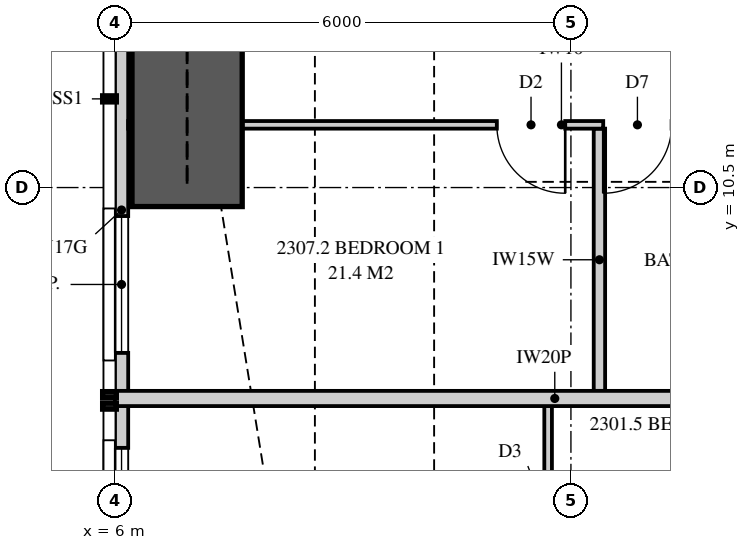
"""IFC4 building model, lengths in metres.
Left out: names, types, materials, properties, quantities, classifications, styles, units other than length and angle.
Written with IfcOpenShell. Run it as: python <this file> out.ifc"""

import sys

from ifc_helpers import new_model, si_unit, direction, frame, frame_2d, origin, place, context, subcontext, project, spatial, polyline, rectangle, outline, extrude, element, fill, save


model = new_model("IFC4")
c1 = context("Model", 3, precision=1e-05, world=origin(), true_north=direction((0.0, 1.0)))
c2 = subcontext(c1, "Body", "Model", "MODEL_VIEW")
j1 = project(units=[si_unit("LENGTHUNIT", "METRE"), si_unit("PLANEANGLEUNIT", "RADIAN")], contexts=[c1])
p1 = place(None, origin())
s1 = spatial("IfcSite", under=j1, at=p1, CompositionType="ELEMENT")
p2 = place(p1, origin())
s2 = spatial("IfcBuilding", under=s1, at=p2, CompositionType="ELEMENT")
p3 = place(p2, frame((0.0, 0.0, 88.1)))
s3 = spatial("IfcBuildingStorey", under=s2, at=p3, CompositionType="ELEMENT", Elevation=88.1)
p4 = place(p3, frame((6.087, 17.358, 0.0), z_axis=(0.0, 0.0, 1.0), x_axis=(0.0, -1.0, 0.0)))
e1 = element("IfcWall", 1, at=p4, inside=s3, PredefinedType="SOLIDWALL", context=c2, shape_type="SweptSolid", body=[
    extrude(outline(polyline([(0.0, 0.0), (14.307, 0.0), (14.307, 3.11), (4.577, 3.11), (4.577, 2.15), (4.484, 2.15), (4.484, 3.11), (4.358, 3.11), (4.358, 2.15), (0.0, 2.15), (0.0, 0.0)])), frame((0.0, 0.087, 0.0), z_axis=(0.0, -1.0, 0.0), x_axis=(1.0, 0.0, 0.0)), (0.0, 0.0, 1.0), 0.175),
])
p5 = place(p4, frame((0.3, 0.0, 0.4)))
e2 = element("IfcOpeningElement", 2, at=p5, cuts=e1, PredefinedType="OPENING", context=c2, shape_type="SweptSolid", body=[
    extrude(rectangle(XDim=1.2, YDim=1.7, at=frame_2d((0.6, 0.85))), frame((0.0, 0.097, 0.0), z_axis=(0.0, -1.0, 0.0), x_axis=(1.0, 0.0, 0.0)), (0.0, 0.0, 1.0), 0.195),
])
p6 = place(p4, frame((7.233, 0.0, 0.4)))
e3 = element("IfcOpeningElement", 3, at=p6, cuts=e1, PredefinedType="OPENING", context=c2, shape_type="SweptSolid", body=[
    extrude(rectangle(XDim=1.8, YDim=1.7, at=frame_2d((0.9, 0.85))), frame((0.0, 0.097, 0.0), z_axis=(0.0, -1.0, 0.0), x_axis=(1.0, 0.0, 0.0)), (0.0, 0.0, 1.0), 0.195),
])
p7 = place(p4, frame((10.283, 0.0, 0.4)))
e4 = element("IfcOpeningElement", 4, at=p7, cuts=e1, PredefinedType="OPENING", context=c2, shape_type="SweptSolid", body=[
    extrude(rectangle(XDim=1.8, YDim=1.7, at=frame_2d((0.9, 0.85))), frame((0.0, 0.097, 0.0), z_axis=(0.0, -1.0, 0.0), x_axis=(1.0, 0.0, 0.0)), (0.0, 0.0, 1.0), 0.195),
])
p8 = place(p3, frame((11.7, 0.175, 0.0), z_axis=(0.0, 0.0, 1.0), x_axis=(0.0, 1.0, 0.0)))
e5 = element("IfcWall", 5, at=p8, inside=s3, PredefinedType="PARTITIONING", context=c2, shape_type="SweptSolid", body=[
    extrude(outline(polyline([(0.0, 0.0), (7.45, 0.0), (7.45, 3.11), (2.708, 3.11), (2.708, 2.15), (0.953, 2.15), (0.953, 3.11), (0.0, 3.11), (0.0, 0.0)])), frame((0.0, 0.05, 0.0), z_axis=(0.0, -1.0, 0.0), x_axis=(1.0, 0.0, 0.0)), (0.0, 0.0, 1.0), 0.1),
])
p9 = place(p8, frame((2.701, 0.0, 0.0)))
e6 = element("IfcOpeningElement", 6, at=p9, cuts=e5, PredefinedType="OPENING", context=c2, shape_type="SweptSolid", body=[
    extrude(rectangle(XDim=0.9, YDim=2.1, at=frame_2d((0.45, 1.05))), frame((0.0, 0.06, 0.0), z_axis=(0.0, -1.0, 0.0), x_axis=(1.0, 0.0, 0.0)), (0.0, 0.0, 1.0), 0.12),
])
p10 = place(p8, frame((5.525, 0.0, 0.0)))
e7 = element("IfcOpeningElement", 7, at=p10, cuts=e5, PredefinedType="OPENING", context=c2, shape_type="SweptSolid", body=[
    extrude(rectangle(XDim=0.9, YDim=2.1, at=frame_2d((0.45, 1.05))), frame((0.0, 0.06, 0.0), z_axis=(0.0, -1.0, 0.0), x_axis=(1.0, 0.0, 0.0)), (0.0, 0.0, 1.0), 0.12),
])
p11 = place(p3, frame((6.0, 7.725, 0.0), z_axis=(0.0, 0.0, 1.0), x_axis=(1.0, 0.0, 0.0)))
e8 = element("IfcWall", 8, at=p11, inside=s3, PredefinedType="PARTITIONING", context=c2, shape_type="SweptSolid", body=[
    extrude(outline(polyline([(0.0, 0.0), (11.575, 0.0), (11.575, 3.11), (11.221, 3.11), (11.221, 2.531), (10.529, 2.531), (10.529, 3.11), (5.51, 3.11), (5.51, 2.51), (2.978, 2.51), (2.978, 2.531), (2.727, 2.531), (2.727, 2.15), (0.884, 2.15), (0.884, 3.11), (0.0, 3.11), (0.0, 0.0)])), frame((0.0, 0.1, 0.0), z_axis=(0.0, -1.0, 0.0), x_axis=(1.0, 0.0, 0.0)), (0.0, 0.0, 1.0), 0.2),
])
p12 = place(p3, frame((6.175, 11.325, 0.0), z_axis=(0.0, 0.0, 1.0), x_axis=(1.0, 0.0, 0.0)))
e9 = element("IfcWall", 9, at=p12, inside=s3, PredefinedType="PARTITIONING", context=c2, shape_type="SweptSolid", body=[
    extrude(outline(polyline([(0.175, 3.11), (0.0, 3.11), (0.0, 0.0), (0.526, 0.0), (0.526, 0.337), (1.024, 0.337), (1.024, 0.0), (11.4, 0.0), (11.4, 3.11), (5.285, 3.11), (5.285, 2.51), (2.765, 2.51), (2.765, 3.11), (2.753, 3.11), (2.753, 2.531), (2.16, 2.531), (2.16, 3.11), (1.918, 3.11), (1.918, 2.15), (1.024, 2.15), (1.024, 1.813), (0.526, 1.813), (0.526, 2.15), (0.175, 2.15), (0.175, 3.11)])), frame((0.0, 0.05, 0.0), z_axis=(0.0, -1.0, 0.0), x_axis=(1.0, 0.0, 0.0)), (0.0, 0.0, 1.0), 0.1),
])
p13 = place(p12, frame((4.85, 0.0, 0.0)))
e10 = element("IfcOpeningElement", 10, at=p13, cuts=e9, PredefinedType="OPENING", context=c2, shape_type="SweptSolid", body=[
    extrude(rectangle(XDim=0.9, YDim=2.1, at=frame_2d((0.45, 1.05))), frame((0.0, 0.06, 0.0), z_axis=(0.0, -1.0, 0.0), x_axis=(1.0, 0.0, 0.0)), (0.0, 0.0, 1.0), 0.12),
])
p14 = place(p12, frame((6.25, 0.0, 0.0)))
e11 = element("IfcOpeningElement", 11, at=p14, cuts=e9, PredefinedType="OPENING", context=c2, shape_type="SweptSolid", body=[
    extrude(rectangle(XDim=0.9, YDim=2.1, at=frame_2d((0.45, 1.05))), frame((0.0, 0.06, 0.0), z_axis=(0.0, -1.0, 0.0), x_axis=(1.0, 0.0, 0.0)), (0.0, 0.0, 1.0), 0.12),
])
p15 = place(p12, frame((9.7, 0.0, 0.0)))
e12 = element("IfcOpeningElement", 12, at=p15, cuts=e9, PredefinedType="OPENING", context=c2, shape_type="SweptSolid", body=[
    extrude(rectangle(XDim=0.7, YDim=2.1, at=frame_2d((0.35, 1.05))), frame((0.0, 0.06, 0.0), z_axis=(0.0, -1.0, 0.0), x_axis=(1.0, 0.0, 0.0)), (0.0, 0.0, 1.0), 0.12),
])
p16 = place(p3, frame((12.375, 7.825, 0.0), z_axis=(0.0, 0.0, 1.0), x_axis=(0.0, 1.0, 0.0)))
e13 = element("IfcWall", 13, at=p16, inside=s3, PredefinedType="PLUMBINGWALL", context=c2, shape_type="SweptSolid", body=[
    extrude(outline(polyline([(0.0, 0.0), (3.45, 0.0), (3.45, 3.11), (3.071, 3.11), (3.071, 2.531), (2.429, 2.531), (2.429, 3.11), (0.0, 3.11), (0.0, 0.0)])), frame((0.0, 0.075, 0.0), z_axis=(0.0, -1.0, 0.0), x_axis=(1.0, 0.0, 0.0)), (0.0, 0.0, 1.0), 0.15),
])
p17 = place(p3, frame((6.95, 10.25, 0.0), z_axis=(0.0, 0.0, 1.0), x_axis=(0.0, 1.0, 0.0)))
e14 = element("IfcWall", 14, at=p17, inside=s3, PredefinedType="SHEAR", context=c2, shape_type="SweptSolid", body=[
    extrude(rectangle(XDim=5.5, YDim=1.45, at=frame_2d((2.75, 0.0))), origin(), (0.0, 0.0, 1.0), 3.35),
])
p18 = place(p6, origin())
e15 = element("IfcWindow", 15, at=p18, inside=s3, PartitioningType="SINGLE_PANEL", PredefinedType="WINDOW", context=c2, shape_type="SweptSolid", body=[
    extrude(rectangle(XDim=1.8, YDim=1.7, at=frame_2d((0.9, 0.85))), frame((0.0, 0.03, 0.0), z_axis=(0.0, -1.0, 0.0), x_axis=(1.0, 0.0, 0.0)), (0.0, 0.0, 1.0), 0.06),
])
fill(e3, e15)
p19 = place(p7, origin())
e16 = element("IfcWindow", 16, at=p19, inside=s3, PartitioningType="SINGLE_PANEL", PredefinedType="WINDOW", context=c2, shape_type="SweptSolid", body=[
    extrude(rectangle(XDim=1.8, YDim=1.7, at=frame_2d((0.9, 0.85))), frame((0.0, 0.03, 0.0), z_axis=(0.0, -1.0, 0.0), x_axis=(1.0, 0.0, 0.0)), (0.0, 0.0, 1.0), 0.06),
])
fill(e4, e16)
p20 = place(p13, frame((0.9, 0.0, 0.0), z_axis=(0.0, 0.0, 1.0), x_axis=(-1.0, 0.0, 0.0)))
e17 = element("IfcDoor", 17, at=p20, inside=s3, OperationType="SINGLE_SWING_LEFT", PredefinedType="DOOR", context=c2, shape_type="SweptSolid", body=[
    extrude(rectangle(XDim=0.9, YDim=2.1, at=frame_2d((0.45, 1.05))), frame((0.0, 0.025, 0.0), z_axis=(0.0, -1.0, 0.0), x_axis=(1.0, 0.0, 0.0)), (0.0, 0.0, 1.0), 0.05),
])
fill(e10, e17)
p21 = place(p14, frame((0.9, 0.0, 0.0), z_axis=(0.0, 0.0, 1.0), x_axis=(-1.0, 0.0, 0.0)))
e18 = element("IfcDoor", 18, at=p21, inside=s3, OperationType="SINGLE_SWING_RIGHT", PredefinedType="DOOR", context=c2, shape_type="SweptSolid", body=[
    extrude(rectangle(XDim=0.9, YDim=2.1, at=frame_2d((0.45, 1.05))), frame((0.0, 0.025, 0.0), z_axis=(0.0, -1.0, 0.0), x_axis=(1.0, 0.0, 0.0)), (0.0, 0.0, 1.0), 0.05),
])
fill(e11, e18)
save(model, sys.argv[1])
